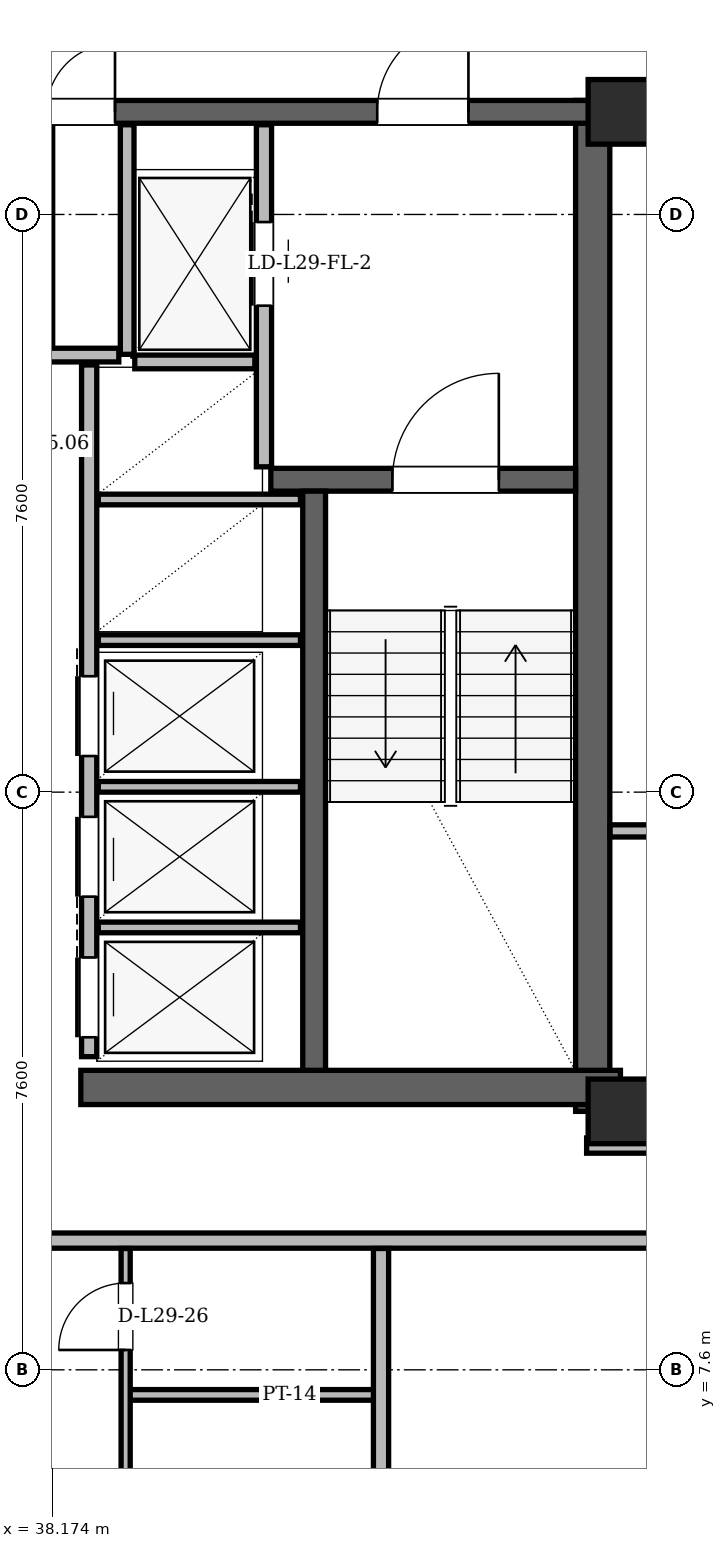
"""IFC4 building model, lengths in metres.
Left out: names, types, materials, properties, quantities, classifications, styles, units other than length and angle.
Written with IfcOpenShell. Run it as: python <this file> out.ifc"""

import sys

from ifc_helpers import new_model, si_unit, direction, frame, frame_2d, origin, origin_2d, place, context, subcontext, project, spatial, rectangle, hollow_rectangle, extrude, element, fill, save


model = new_model("IFC4")
c1 = context("Model", 3, precision=1e-05, world=origin(), true_north=direction((0.0, 1.0)))
c2 = subcontext(c1, "Body", "Model", "MODEL_VIEW")
j1 = project(units=[si_unit("LENGTHUNIT", "METRE"), si_unit("PLANEANGLEUNIT", "RADIAN")], contexts=[c1])
p1 = place(None, origin())
s1 = spatial("IfcSite", under=j1, at=p1, CompositionType="ELEMENT")
p2 = place(p1, origin())
s2 = spatial("IfcBuilding", under=s1, at=p2, CompositionType="ELEMENT")
p3 = place(p2, frame((0.0, 0.0, 112.2)))
s3 = spatial("IfcBuildingStorey", under=s2, at=p3, CompositionType="ELEMENT", Elevation=112.2)
for number, where, z_axis, x_axis in (
    (1, (45.65, 11.0, 0.0), (0.0, 0.0, 1.0), (1.0, 0.0, 0.0)),
    (2, (45.65, 24.15, 0.0), (0.0, 0.0, 1.0), (1.0, 0.0, 0.0)),
):
    element("IfcColumn", number, at=place(p3, frame(where, z_axis=z_axis, x_axis=x_axis)), inside=s3, PredefinedType="COLUMN", context=c2, shape_type="SweptSolid", body=[
        extrude(hollow_rectangle(XDim=0.85, YDim=0.85, WallThickness=0.07, at=origin_2d()), origin(), (0.0, 0.0, 1.0), 3.6),
    ])
p4 = place(p3, frame((45.285, 11.0, 0.0), z_axis=(0.0, 0.0, 1.0), x_axis=(0.0, 1.0, 0.0)))
e3 = element("IfcWall", 3, at=p4, inside=s3, PredefinedType="SHEAR", context=c2, shape_type="SweptSolid", body=[
    extrude(rectangle(XDim=13.3, YDim=0.45, at=frame_2d((6.65, 0.0))), origin(), (0.0, 0.0, 1.0), 3.36),
])
p5 = place(p3, frame((38.55, 11.315, 0.0), z_axis=(0.0, 0.0, 1.0), x_axis=(1.0, 0.0, 0.0)))
e4 = element("IfcWall", 4, at=p5, inside=s3, PredefinedType="SHEAR", context=c2, shape_type="SweptSolid", body=[
    extrude(rectangle(XDim=7.1, YDim=0.45, at=frame_2d((3.55, 0.0))), origin(), (0.0, 0.0, 1.0), 3.36),
])
p6 = place(p3, frame((29.65, 24.15, 0.0), z_axis=(0.0, 0.0, 1.0), x_axis=(1.0, 0.0, 0.0)))
e5 = element("IfcWall", 5, at=p6, inside=s3, PredefinedType="SHEAR", context=c2, shape_type="SweptSolid", body=[
    extrude(rectangle(XDim=15.7, YDim=0.3, at=frame_2d((7.85, 0.0))), origin(), (0.0, 0.0, 1.0), 3.36),
])
p7 = place(p6, frame((1.7, 0.0, 0.0)))
e6 = element("IfcOpeningElement", 6, at=p7, cuts=e5, PredefinedType="OPENING", context=c2, shape_type="SweptSolid", body=[
    extrude(rectangle(XDim=1.2, YDim=2.2, at=frame_2d((0.6, 1.1))), frame((0.0, 0.15, 0.0), z_axis=(0.0, -1.0, 0.0), x_axis=(1.0, 0.0, 0.0)), (0.0, 0.0, 1.0), 0.3),
])
p8 = place(p6, frame((12.8, 0.0, 0.0)))
e7 = element("IfcOpeningElement", 7, at=p8, cuts=e5, PredefinedType="OPENING", context=c2, shape_type="SweptSolid", body=[
    extrude(rectangle(XDim=1.2, YDim=2.2, at=frame_2d((0.6, 1.1))), frame((0.0, 0.15, 0.0), z_axis=(0.0, -1.0, 0.0), x_axis=(1.0, 0.0, 0.0)), (0.0, 0.0, 1.0), 0.3),
])
p9 = place(p6, frame((6.55, 0.0, 0.0)))
e8 = element("IfcOpeningElement", 8, at=p9, cuts=e5, PredefinedType="OPENING", context=c2, shape_type="SweptSolid", body=[
    extrude(rectangle(XDim=0.9, YDim=2.05, at=frame_2d((0.45, 1.025))), frame((0.0, 0.15, 0.0), z_axis=(0.0, -1.0, 0.0), x_axis=(1.0, 0.0, 0.0)), (0.0, 0.0, 1.0), 0.3),
])
p10 = place(p6, frame((8.45, 0.0, 0.0)))
e9 = element("IfcOpeningElement", 9, at=p10, cuts=e5, PredefinedType="OPENING", context=c2, shape_type="SweptSolid", body=[
    extrude(rectangle(XDim=0.9, YDim=2.05, at=frame_2d((0.45, 1.025))), frame((0.0, 0.15, 0.0), z_axis=(0.0, -1.0, 0.0), x_axis=(1.0, 0.0, 0.0)), (0.0, 0.0, 1.0), 0.3),
])
p11 = place(p3, frame((41.05, 19.31, 0.0), z_axis=(0.0, 0.0, 1.0), x_axis=(1.0, 0.0, 0.0)))
e10 = element("IfcWall", 10, at=p11, inside=s3, PredefinedType="SHEAR", context=c2, shape_type="SweptSolid", body=[
    extrude(rectangle(XDim=4.01, YDim=0.3, at=frame_2d((2.005, 0.0))), origin(), (0.0, 0.0, 1.0), 3.36),
])
p12 = place(p11, frame((1.6, 0.0, 0.0)))
e11 = element("IfcOpeningElement", 11, at=p12, cuts=e10, PredefinedType="OPENING", context=c2, shape_type="SweptSolid", body=[
    extrude(rectangle(XDim=1.4, YDim=2.2, at=frame_2d((0.7, 1.1))), frame((0.0, 0.15, 0.0), z_axis=(0.0, -1.0, 0.0), x_axis=(1.0, 0.0, 0.0)), (0.0, 0.0, 1.0), 0.3),
])
p13 = place(p3, frame((41.62, 11.54, 0.0), z_axis=(0.0, 0.0, 1.0), x_axis=(0.0, 1.0, 0.0)))
e12 = element("IfcWall", 12, at=p13, inside=s3, PredefinedType="SHEAR", context=c2, shape_type="SweptSolid", body=[
    extrude(rectangle(XDim=7.62, YDim=0.3, at=frame_2d((3.81, 0.0))), origin(), (0.0, 0.0, 1.0), 3.36),
])
p14 = place(p3, frame((60.525, 13.33, 0.0), z_axis=(0.0, 0.0, 1.0), x_axis=(-0.500004027594, 0.866023078439, 0.0)))
e13 = element("IfcWall", 13, at=p14, inside=s3, PredefinedType="SOLIDWALL", context=c2, shape_type="SweptSolid", body=[
    extrude(rectangle(XDim=34.75, YDim=0.34, at=frame_2d((17.375, 0.0))), origin(), (0.0, 0.0, 1.0), 2.578),
])
p15 = place(p14, frame((6.369, 0.0, 0.0)))
e14 = element("IfcOpeningElement", 14, at=p15, cuts=e13, PredefinedType="OPENING", context=c2, shape_type="SweptSolid", body=[
    extrude(rectangle(XDim=1.5, YDim=2.2, at=frame_2d((0.75, 1.1))), frame((0.0, 0.17, 0.0), z_axis=(0.0, -1.0, 0.0), x_axis=(1.0, 0.0, 0.0)), (0.0, 0.0, 1.0), 0.34),
])
p16 = place(p14, frame((25.216, 0.0, 0.0)))
e15 = element("IfcOpeningElement", 15, at=p16, cuts=e13, PredefinedType="OPENING", context=c2, shape_type="SweptSolid", body=[
    extrude(rectangle(XDim=1.5, YDim=2.2, at=frame_2d((0.75, 1.1))), frame((0.0, 0.17, 0.0), z_axis=(0.0, -1.0, 0.0), x_axis=(1.0, 0.0, 0.0)), (0.0, 0.0, 1.0), 0.34),
])
p17 = place(p14, frame((3.22, 0.0, 0.85)))
e16 = element("IfcOpeningElement", 16, at=p17, cuts=e13, PredefinedType="OPENING", context=c2, shape_type="SweptSolid", body=[
    extrude(rectangle(XDim=1.2, YDim=1.48, at=frame_2d((0.6, 0.74))), frame((0.0, 0.17, 0.0), z_axis=(0.0, -1.0, 0.0), x_axis=(1.0, 0.0, 0.0)), (0.0, 0.0, 1.0), 0.34),
])
p18 = place(p14, frame((11.193, 0.0, 0.85)))
e17 = element("IfcOpeningElement", 17, at=p18, cuts=e13, PredefinedType="OPENING", context=c2, shape_type="SweptSolid", body=[
    extrude(rectangle(XDim=1.2, YDim=1.48, at=frame_2d((0.6, 0.74))), frame((0.0, 0.17, 0.0), z_axis=(0.0, -1.0, 0.0), x_axis=(1.0, 0.0, 0.0)), (0.0, 0.0, 1.0), 0.34),
])
p19 = place(p14, frame((14.913, 0.0, 0.85)))
e18 = element("IfcOpeningElement", 18, at=p19, cuts=e13, PredefinedType="OPENING", context=c2, shape_type="SweptSolid", body=[
    extrude(rectangle(XDim=2.2, YDim=1.618, at=frame_2d((1.1, 0.809))), frame((0.0, 0.17, 0.0), z_axis=(0.0, -1.0, 0.0), x_axis=(1.0, 0.0, 0.0)), (0.0, 0.0, 1.0), 0.34),
])
p20 = place(p14, frame((21.724, 0.0, 0.85)))
e19 = element("IfcOpeningElement", 19, at=p20, cuts=e13, PredefinedType="OPENING", context=c2, shape_type="SweptSolid", body=[
    extrude(rectangle(XDim=1.6, YDim=1.618, at=frame_2d((0.8, 0.809))), frame((0.0, 0.17, 0.0), z_axis=(0.0, -1.0, 0.0), x_axis=(1.0, 0.0, 0.0)), (0.0, 0.0, 1.0), 0.34),
])
p21 = place(p14, frame((31.928, 0.0, 0.85)))
e20 = element("IfcOpeningElement", 20, at=p21, cuts=e13, PredefinedType="OPENING", context=c2, shape_type="SweptSolid", body=[
    extrude(rectangle(XDim=1.4, YDim=1.6, at=frame_2d((0.7, 0.8))), frame((0.0, 0.17, 0.0), z_axis=(0.0, -1.0, 0.0), x_axis=(1.0, 0.0, 0.0)), (0.0, 0.0, 1.0), 0.34),
])
p22 = place(p3, frame((40.96, 19.48, 0.0), z_axis=(0.0, 0.0, 1.0), x_axis=(0.0, 1.0, 0.0)))
e21 = element("IfcWall", 21, at=p22, inside=s3, PredefinedType="PARTITIONING", context=c2, shape_type="SweptSolid", body=[
    extrude(rectangle(XDim=4.5, YDim=0.2, at=frame_2d((2.25, 0.0))), origin(), (0.0, 0.0, 1.0), 2.4),
])
p23 = place(p22, frame((2.12, 0.0, 0.0)))
e22 = element("IfcOpeningElement", 22, at=p23, cuts=e21, PredefinedType="OPENING", context=c2, shape_type="SweptSolid", body=[
    extrude(rectangle(XDim=1.1, YDim=2.2, at=frame_2d((0.55, 1.1))), frame((0.0, 0.1, 0.0), z_axis=(0.0, -1.0, 0.0), x_axis=(1.0, 0.0, 0.0)), (0.0, 0.0, 1.0), 0.2),
])
p24 = place(p3, frame((39.16, 20.96, 0.0), z_axis=(0.0, 0.0, 1.0), x_axis=(0.0, 1.0, 0.0)))
e23 = element("IfcWall", 23, at=p24, inside=s3, PredefinedType="PARTITIONING", context=c2, shape_type="SweptSolid", body=[
    extrude(rectangle(XDim=3.02, YDim=0.18, at=frame_2d((1.51, 0.0))), origin(), (0.0, 0.0, 1.0), 2.4),
])
p25 = place(p3, frame((39.26, 20.86, 0.0), z_axis=(0.0, 0.0, 1.0), x_axis=(1.0, 0.0, 0.0)))
e24 = element("IfcWall", 24, at=p25, inside=s3, PredefinedType="PARTITIONING", context=c2, shape_type="SweptSolid", body=[
    extrude(rectangle(XDim=1.58, YDim=0.18, at=frame_2d((0.79, 0.0))), origin(), (0.0, 0.0, 1.0), 3.36),
])
p26 = place(p3, frame((38.66, 11.72, 0.0), z_axis=(0.0, 0.0, 1.0), x_axis=(0.0, 1.0, 0.0)))
e25 = element("IfcWall", 25, at=p26, inside=s3, PredefinedType="PARTITIONING", context=c2, shape_type="SweptSolid", body=[
    extrude(rectangle(XDim=9.1, YDim=0.2, at=frame_2d((4.55, 0.0))), origin(), (0.0, 0.0, 1.0), 3.36),
])
p27 = place(p26, frame((0.255, 0.0, 0.0)))
e26 = element("IfcOpeningElement", 26, at=p27, cuts=e25, PredefinedType="OPENING", context=c2, shape_type="SweptSolid", body=[
    extrude(rectangle(XDim=1.05, YDim=2.15, at=frame_2d((0.525, 1.075))), frame((0.0, 0.1, 0.0), z_axis=(0.0, -1.0, 0.0), x_axis=(1.0, 0.0, 0.0)), (0.0, 0.0, 1.0), 0.2),
])
p28 = place(p26, frame((2.105, 0.0, 0.0)))
e27 = element("IfcOpeningElement", 27, at=p28, cuts=e25, PredefinedType="OPENING", context=c2, shape_type="SweptSolid", body=[
    extrude(rectangle(XDim=1.05, YDim=2.15, at=frame_2d((0.525, 1.075))), frame((0.0, 0.1, 0.0), z_axis=(0.0, -1.0, 0.0), x_axis=(1.0, 0.0, 0.0)), (0.0, 0.0, 1.0), 0.2),
])
p29 = place(p26, frame((3.955, 0.0, 0.0)))
e28 = element("IfcOpeningElement", 28, at=p29, cuts=e25, PredefinedType="OPENING", context=c2, shape_type="SweptSolid", body=[
    extrude(rectangle(XDim=1.05, YDim=2.15, at=frame_2d((0.525, 1.075))), frame((0.0, 0.1, 0.0), z_axis=(0.0, -1.0, 0.0), x_axis=(1.0, 0.0, 0.0)), (0.0, 0.0, 1.0), 0.2),
])
for number, where, z_axis, x_axis in (
    (29, (38.78, 13.42, 0.0), (0.0, 0.0, 1.0), (1.0, 0.0, 0.0)),
    (30, (38.78, 15.27, 0.0), (0.0, 0.0, 1.0), (1.0, 0.0, 0.0)),
    (31, (38.78, 17.2, 0.0), (0.0, 0.0, 1.0), (1.0, 0.0, 0.0)),
    (32, (38.78, 19.05, 0.0), (0.0, 0.0, 1.0), (1.0, 0.0, 0.0)),
):
    element("IfcWall", number, at=place(p3, frame(where, z_axis=z_axis, x_axis=x_axis)), inside=s3, PredefinedType="PARTITIONING", context=c2, shape_type="SweptSolid", body=[
        extrude(rectangle(XDim=2.66, YDim=0.14, at=frame_2d((1.33, 0.0))), origin(), (0.0, 0.0, 1.0), 3.36),
    ])
p30 = place(p3, frame((35.95, 20.95, 0.0), z_axis=(0.0, 0.0, 1.0), x_axis=(1.0, 0.0, 0.0)))
e33 = element("IfcWall", 33, at=p30, inside=s3, PredefinedType="PARTITIONING", context=c2, shape_type="SweptSolid", body=[
    extrude(rectangle(XDim=3.1, YDim=0.18, at=frame_2d((1.55, 0.0))), origin(), (0.0, 0.0, 1.0), 3.36),
])
p31 = place(p3, frame((38.11, 21.06, 0.0), z_axis=(0.0, 0.0, 1.0), x_axis=(0.0, 1.0, 0.0)))
e34 = element("IfcWall", 34, at=p31, inside=s3, PredefinedType="PARTITIONING", context=c2, shape_type="SweptSolid", body=[
    extrude(rectangle(XDim=2.92, YDim=0.14, at=frame_2d((1.46, 0.0))), origin(), (0.0, 0.0, 1.0), 2.4),
])
p32 = place(p3, frame((39.14, 7.27, 0.0), z_axis=(0.0, 0.0, 1.0), x_axis=(1.0, 0.0, 0.0)))
e35 = element("IfcWall", 35, at=p32, inside=s3, PredefinedType="PARTITIONING", context=c2, shape_type="SweptSolid", body=[
    extrude(rectangle(XDim=3.41, YDim=0.14, at=frame_2d((1.705, 0.0))), origin(), (0.0, 0.0, 1.0), 3.36),
])
p33 = place(p3, frame((19.6, 9.3, 0.0), z_axis=(0.0, 0.0, 1.0), x_axis=(1.0, 0.0, 0.0)))
e36 = element("IfcWall", 36, at=p33, inside=s3, PredefinedType="PARTITIONING", context=c2, shape_type="SweptSolid", body=[
    extrude(rectangle(XDim=30.4, YDim=0.2, at=frame_2d((15.2, 0.0))), origin(), (0.0, 0.0, 1.0), 2.814),
])
p34 = place(p33, frame((5.783, 0.0, 0.0)))
e37 = element("IfcOpeningElement", 37, at=p34, cuts=e36, PredefinedType="OPENING", context=c2, shape_type="SweptSolid", body=[
    extrude(rectangle(XDim=1.0, YDim=2.18, at=frame_2d((0.5, 1.09))), frame((0.0, 0.1, 0.0), z_axis=(0.0, -1.0, 0.0), x_axis=(1.0, 0.0, 0.0)), (0.0, 0.0, 1.0), 0.2),
])
p35 = place(p33, frame((14.72, 0.0, 0.0)))
e38 = element("IfcOpeningElement", 38, at=p35, cuts=e36, PredefinedType="OPENING", context=c2, shape_type="SweptSolid", body=[
    extrude(rectangle(XDim=1.0, YDim=2.18, at=frame_2d((0.5, 1.09))), frame((0.0, 0.1, 0.0), z_axis=(0.0, -1.0, 0.0), x_axis=(1.0, 0.0, 0.0)), (0.0, 0.0, 1.0), 0.2),
])
p36 = place(p33, frame((26.576, 0.0, 0.0)))
e39 = element("IfcOpeningElement", 39, at=p36, cuts=e36, PredefinedType="OPENING", context=c2, shape_type="SweptSolid", body=[
    extrude(rectangle(XDim=1.0, YDim=2.18, at=frame_2d((0.5, 1.09))), frame((0.0, 0.1, 0.0), z_axis=(0.0, -1.0, 0.0), x_axis=(1.0, 0.0, 0.0)), (0.0, 0.0, 1.0), 0.2),
])
p37 = place(p3, frame((45.205, 10.55, 0.0), z_axis=(0.0, 0.0, 1.0), x_axis=(1.0, 0.0, 0.0)))
e40 = element("IfcWall", 40, at=p37, inside=s3, PredefinedType="PARTITIONING", context=c2, shape_type="SweptSolid", body=[
    extrude(rectangle(XDim=0.89, YDim=0.2, at=frame_2d((0.445, 0.0))), origin(), (0.0, 0.0, 1.0), 3.36),
])
p38 = place(p3, frame((45.514, 14.69, 0.0), z_axis=(0.0, 0.0, 1.0), x_axis=(1.0, 0.0, 0.0)))
e41 = element("IfcWall", 41, at=p38, inside=s3, PredefinedType="PARTITIONING", context=c2, shape_type="SweptSolid", body=[
    extrude(rectangle(XDim=14.025, YDim=0.16, at=frame_2d((7.012, 0.0))), origin(), (0.0, 0.0, 1.0), 2.4),
])
p39 = place(p38, frame((4.322, 0.0, 0.0)))
e42 = element("IfcOpeningElement", 42, at=p39, cuts=e41, PredefinedType="OPENING", context=c2, shape_type="SweptSolid", body=[
    extrude(rectangle(XDim=0.92, YDim=2.12, at=frame_2d((0.46, 1.06))), frame((0.0, 0.08, 0.0), z_axis=(0.0, -1.0, 0.0), x_axis=(1.0, 0.0, 0.0)), (0.0, 0.0, 1.0), 0.16),
])
p40 = place(p38, frame((10.379, 0.0, 0.0)))
e43 = element("IfcOpeningElement", 43, at=p40, cuts=e41, PredefinedType="OPENING", context=c2, shape_type="SweptSolid", body=[
    extrude(rectangle(XDim=0.95, YDim=2.1, at=frame_2d((0.475, 1.05))), frame((0.0, 0.08, 0.0), z_axis=(0.0, -1.0, 0.0), x_axis=(1.0, 0.0, 0.0)), (0.0, 0.0, 1.0), 0.16),
])
p41 = place(p38, frame((12.68, 0.0, 0.0)))
e44 = element("IfcOpeningElement", 44, at=p41, cuts=e41, PredefinedType="OPENING", context=c2, shape_type="SweptSolid", body=[
    extrude(rectangle(XDim=0.88, YDim=2.08, at=frame_2d((0.44, 1.04))), frame((0.0, 0.08, 0.0), z_axis=(0.0, -1.0, 0.0), x_axis=(1.0, 0.0, 0.0)), (0.0, 0.0, 1.0), 0.16),
])
p42 = place(p3, frame((39.14, 3.719, 0.0), z_axis=(0.0, 0.0, 1.0), x_axis=(0.0, 1.0, 0.0)))
e45 = element("IfcWall", 45, at=p42, inside=s3, PredefinedType="PARTITIONING", context=c2, shape_type="SweptSolid", body=[
    extrude(rectangle(XDim=5.477, YDim=0.12, at=frame_2d((2.739, 0.0))), origin(), (0.0, 0.0, 1.0), 3.36),
])
p43 = place(p42, frame((1.275, 0.0, 0.0)))
e46 = element("IfcOpeningElement", 46, at=p43, cuts=e45, PredefinedType="OPENING", context=c2, shape_type="SweptSolid", body=[
    extrude(rectangle(XDim=0.95, YDim=2.1, at=frame_2d((0.475, 1.05))), frame((0.0, 0.06, 0.0), z_axis=(0.0, -1.0, 0.0), x_axis=(1.0, 0.0, 0.0)), (0.0, 0.0, 1.0), 0.12),
])
p44 = place(p42, frame((4.143, 0.0, 0.0)))
e47 = element("IfcOpeningElement", 47, at=p44, cuts=e45, PredefinedType="OPENING", context=c2, shape_type="SweptSolid", body=[
    extrude(rectangle(XDim=0.88, YDim=2.08, at=frame_2d((0.44, 1.04))), frame((0.0, 0.06, 0.0), z_axis=(0.0, -1.0, 0.0), x_axis=(1.0, 0.0, 0.0)), (0.0, 0.0, 1.0), 0.12),
])
p45 = place(p3, frame((42.5, 3.719, 0.0), z_axis=(0.0, 0.0, 1.0), x_axis=(0.0, 1.0, 0.0)))
e48 = element("IfcWall", 48, at=p45, inside=s3, PredefinedType="PARTITIONING", context=c2, shape_type="SweptSolid", body=[
    extrude(rectangle(XDim=5.477, YDim=0.2, at=frame_2d((2.739, 0.0))), origin(), (0.0, 0.0, 1.0), 2.946),
])
p46 = place(p23, origin())
e49 = element("IfcDoor", 49, at=p46, inside=s3, OperationType="SLIDING_TO_RIGHT", PredefinedType="DOOR", context=c2, shape_type="SweptSolid", body=[
    extrude(rectangle(XDim=1.1, YDim=2.2, at=frame_2d((0.55, 1.1))), frame((0.0, 0.025, 0.0), z_axis=(0.0, -1.0, 0.0), x_axis=(1.0, 0.0, 0.0)), (0.0, 0.0, 1.0), 0.05),
])
fill(e22, e49)
p47 = place(p27, origin())
e50 = element("IfcDoor", 50, at=p47, inside=s3, OperationType="SLIDING_TO_RIGHT", PredefinedType="DOOR", context=c2, shape_type="SweptSolid", body=[
    extrude(rectangle(XDim=1.05, YDim=2.15, at=frame_2d((0.525, 1.075))), frame((0.0, 0.025, 0.0), z_axis=(0.0, -1.0, 0.0), x_axis=(1.0, 0.0, 0.0)), (0.0, 0.0, 1.0), 0.05),
])
fill(e26, e50)
p48 = place(p28, origin())
e51 = element("IfcDoor", 51, at=p48, inside=s3, OperationType="SLIDING_TO_LEFT", PredefinedType="DOOR", context=c2, shape_type="SweptSolid", body=[
    extrude(rectangle(XDim=1.05, YDim=2.15, at=frame_2d((0.525, 1.075))), frame((0.0, 0.025, 0.0), z_axis=(0.0, -1.0, 0.0), x_axis=(1.0, 0.0, 0.0)), (0.0, 0.0, 1.0), 0.05),
])
fill(e27, e51)
p49 = place(p29, origin())
e52 = element("IfcDoor", 52, at=p49, inside=s3, OperationType="SLIDING_TO_RIGHT", PredefinedType="DOOR", context=c2, shape_type="SweptSolid", body=[
    extrude(rectangle(XDim=1.05, YDim=2.15, at=frame_2d((0.525, 1.075))), frame((0.0, 0.025, 0.0), z_axis=(0.0, -1.0, 0.0), x_axis=(1.0, 0.0, 0.0)), (0.0, 0.0, 1.0), 0.05),
])
fill(e28, e52)
p50 = place(p12, origin())
e53 = element("IfcDoor", 53, at=p50, inside=s3, OperationType="SINGLE_SWING_RIGHT", PredefinedType="DOOR", context=c2, shape_type="SweptSolid", body=[
    extrude(rectangle(XDim=1.4, YDim=2.2, at=frame_2d((0.7, 1.1))), frame((0.0, 0.025, 0.0), z_axis=(0.0, -1.0, 0.0), x_axis=(1.0, 0.0, 0.0)), (0.0, 0.0, 1.0), 0.05),
])
fill(e11, e53)
p51 = place(p8, origin())
e54 = element("IfcDoor", 54, at=p51, inside=s3, OperationType="SINGLE_SWING_RIGHT", PredefinedType="DOOR", context=c2, shape_type="SweptSolid", body=[
    extrude(rectangle(XDim=1.2, YDim=2.2, at=frame_2d((0.6, 1.1))), frame((0.0, 0.025, 0.0), z_axis=(0.0, -1.0, 0.0), x_axis=(1.0, 0.0, 0.0)), (0.0, 0.0, 1.0), 0.05),
])
fill(e7, e54)
p52 = place(p10, origin())
e55 = element("IfcDoor", 55, at=p52, inside=s3, OperationType="SINGLE_SWING_RIGHT", PredefinedType="DOOR", context=c2, shape_type="SweptSolid", body=[
    extrude(rectangle(XDim=0.9, YDim=2.05, at=frame_2d((0.45, 1.025))), frame((0.0, 0.025, 0.0), z_axis=(0.0, -1.0, 0.0), x_axis=(1.0, 0.0, 0.0)), (0.0, 0.0, 1.0), 0.05),
])
fill(e9, e55)
p53 = place(p44, origin())
e56 = element("IfcDoor", 56, at=p53, inside=s3, OperationType="SINGLE_SWING_LEFT", PredefinedType="DOOR", context=c2, shape_type="SweptSolid", body=[
    extrude(rectangle(XDim=0.88, YDim=2.08, at=frame_2d((0.44, 1.04))), frame((0.0, 0.025, 0.0), z_axis=(0.0, -1.0, 0.0), x_axis=(1.0, 0.0, 0.0)), (0.0, 0.0, 1.0), 0.05),
])
fill(e47, e56)
save(model, sys.argv[1])
